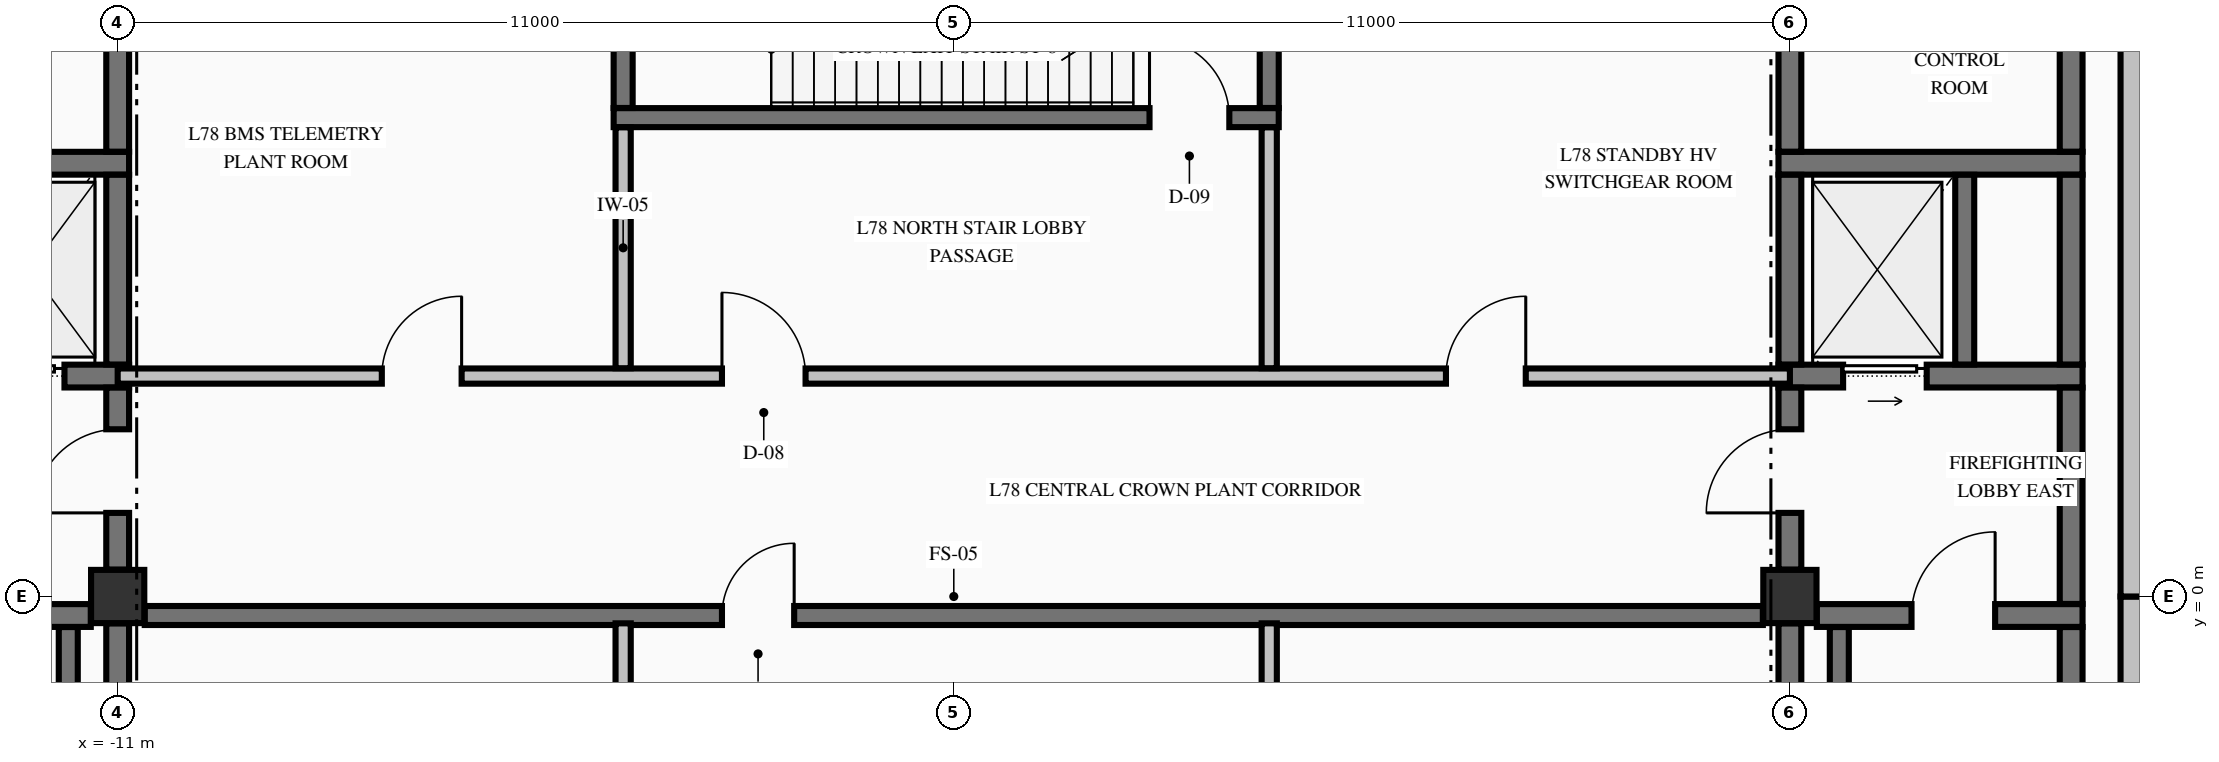
"""IFC4 building model, lengths in metres.
Left out: names, types, materials, properties, quantities, classifications, styles, units other than length and angle.
Written with IfcOpenShell. Run it as: python <this file> out.ifc"""

import sys

from ifc_helpers import new_model, si_unit, direction, frame, frame_2d, origin, origin_2d, place, context, subcontext, project, spatial, rectangle, extrude, element, fill, save


model = new_model("IFC4")
c1 = context("Model", 3, precision=1e-05, world=origin(), true_north=direction((0.0, 1.0)))
c2 = subcontext(c1, "Body", "Model", "MODEL_VIEW")
j1 = project(units=[si_unit("LENGTHUNIT", "METRE"), si_unit("PLANEANGLEUNIT", "RADIAN")], contexts=[c1])
p1 = place(None, origin())
s1 = spatial("IfcSite", under=j1, at=p1, CompositionType="ELEMENT")
p2 = place(p1, origin())
s2 = spatial("IfcBuilding", under=s1, at=p2, CompositionType="ELEMENT")
p3 = place(p2, frame((0.0, 0.0, 290.98)))
s3 = spatial("IfcBuildingStorey", under=s2, at=p3, CompositionType="ELEMENT", Elevation=290.98)
for number, where, z_axis, x_axis in (
    (1, (-11.0, 0.0, -0.325), (0.0, 0.0, 1.0), (1.0, 0.0, 0.0)),
    (2, (11.0, 0.0, -0.325), (0.0, 0.0, 1.0), (1.0, 0.0, 0.0)),
):
    element("IfcColumn", number, at=place(p3, frame(where, z_axis=z_axis, x_axis=x_axis)), inside=s3, PredefinedType="COLUMN", context=c2, shape_type="SweptSolid", body=[
        extrude(rectangle(XDim=0.7, YDim=0.7, at=origin_2d()), origin(), (0.0, 0.0, 1.0), 3.06),
    ])
for number, where, z_axis, x_axis in (
    (3, (15.5, -9.0, 0.0), (0.0, 0.0, 1.0), (0.0, 1.0, 0.0)),
    (4, (15.5, 0.0, 0.0), (0.0, 0.0, 1.0), (0.0, 1.0, 0.0)),
):
    element("IfcWall", number, at=place(p3, frame(where, z_axis=z_axis, x_axis=x_axis)), inside=s3, PredefinedType="STANDARD", context=c2, shape_type="SweptSolid", body=[
        extrude(rectangle(XDim=9.0, YDim=0.3, at=frame_2d((4.5, 0.0))), origin(), (0.0, 0.0, 1.0), 2.127),
    ])
p4 = place(p3, frame((-14.85, -0.25, 0.0), z_axis=(0.0, 0.0, 1.0), x_axis=(1.0, 0.0, 0.0)))
e5 = element("IfcWall", 5, at=p4, inside=s3, PredefinedType="SHEAR", context=c2, shape_type="SweptSolid", body=[
    extrude(rectangle(XDim=3.496, YDim=0.3, at=frame_2d((1.748, 0.0))), origin(), (0.0, 0.0, 1.0), 2.735),
])
p5 = place(p4, frame((1.15, 0.0, 0.0)))
e6 = element("IfcOpeningElement", 6, at=p5, cuts=e5, PredefinedType="OPENING", context=c2, shape_type="SweptSolid", body=[
    extrude(rectangle(XDim=1.1, YDim=2.15, at=frame_2d((0.55, 1.075))), frame((0.0, 0.16, 0.0), z_axis=(0.0, -1.0, 0.0), x_axis=(1.0, 0.0, 0.0)), (0.0, 0.0, 1.0), 0.32),
])
p6 = place(p3, frame((11.354, -0.25, 0.0), z_axis=(0.0, 0.0, 1.0), x_axis=(1.0, 0.0, 0.0)))
e7 = element("IfcWall", 7, at=p6, inside=s3, PredefinedType="SHEAR", context=c2, shape_type="SweptSolid", body=[
    extrude(rectangle(XDim=3.496, YDim=0.3, at=frame_2d((1.748, 0.0))), origin(), (0.0, 0.0, 1.0), 2.735),
])
p7 = place(p6, frame((1.246, 0.0, 0.0)))
e8 = element("IfcOpeningElement", 8, at=p7, cuts=e7, PredefinedType="OPENING", context=c2, shape_type="SweptSolid", body=[
    extrude(rectangle(XDim=1.1, YDim=2.15, at=frame_2d((0.55, 1.075))), frame((0.0, 0.16, 0.0), z_axis=(0.0, -1.0, 0.0), x_axis=(1.0, 0.0, 0.0)), (0.0, 0.0, 1.0), 0.32),
])
p8 = place(p3, frame((-14.85, 2.9, 0.0), z_axis=(0.0, 0.0, 1.0), x_axis=(1.0, 0.0, 0.0)))
e9 = element("IfcWall", 9, at=p8, inside=s3, PredefinedType="SHEAR", context=c2, shape_type="SweptSolid", body=[
    extrude(rectangle(XDim=4.0, YDim=0.3, at=frame_2d((2.0, 0.0))), origin(), (0.0, 0.0, 1.0), 2.735),
])
p9 = place(p8, frame((2.05, 0.0, 0.0)))
e10 = element("IfcOpeningElement", 10, at=p9, cuts=e9, PredefinedType="OPENING", context=c2, shape_type="SweptSolid", body=[
    extrude(rectangle(XDim=1.1, YDim=2.2, at=frame_2d((0.55, 1.1))), frame((0.0, 0.16, 0.0), z_axis=(0.0, -1.0, 0.0), x_axis=(1.0, 0.0, 0.0)), (0.0, 0.0, 1.0), 0.32),
])
p10 = place(p3, frame((10.85, 2.9, 0.0), z_axis=(0.0, 0.0, 1.0), x_axis=(1.0, 0.0, 0.0)))
e11 = element("IfcWall", 11, at=p10, inside=s3, PredefinedType="SHEAR", context=c2, shape_type="SweptSolid", body=[
    extrude(rectangle(XDim=4.0, YDim=0.3, at=frame_2d((2.0, 0.0))), origin(), (0.0, 0.0, 1.0), 2.735),
])
p11 = place(p10, frame((0.85, 0.0, 0.0)))
e12 = element("IfcOpeningElement", 12, at=p11, cuts=e11, PredefinedType="OPENING", context=c2, shape_type="SweptSolid", body=[
    extrude(rectangle(XDim=1.1, YDim=2.2, at=frame_2d((0.55, 1.1))), frame((0.0, 0.16, 0.0), z_axis=(0.0, -1.0, 0.0), x_axis=(1.0, 0.0, 0.0)), (0.0, 0.0, 1.0), 0.32),
])
for number, where, z_axis, x_axis in (
    (13, (-14.85, 5.7, 0.0), (0.0, 0.0, 1.0), (1.0, 0.0, 0.0)),
    (14, (10.85, 5.7, 0.0), (0.0, 0.0, 1.0), (1.0, 0.0, 0.0)),
):
    element("IfcWall", number, at=place(p3, frame(where, z_axis=z_axis, x_axis=x_axis)), inside=s3, PredefinedType="SHEAR", context=c2, shape_type="SweptSolid", body=[
        extrude(rectangle(XDim=4.0, YDim=0.3, at=frame_2d((2.0, 0.0))), origin(), (0.0, 0.0, 1.0), 2.735),
    ])
p12 = place(p3, frame((-4.475, 6.3, 0.0), z_axis=(0.0, 0.0, 1.0), x_axis=(1.0, 0.0, 0.0)))
e15 = element("IfcWall", 15, at=p12, inside=s3, PredefinedType="SOLIDWALL", context=c2, shape_type="SweptSolid", body=[
    extrude(rectangle(XDim=8.75, YDim=0.25, at=frame_2d((4.375, 0.0))), origin(), (0.0, 0.0, 1.0), 2.735),
])
p13 = place(p12, frame((7.05, 0.0, 0.0)))
e16 = element("IfcOpeningElement", 16, at=p13, cuts=e15, PredefinedType="OPENING", context=c2, shape_type="SweptSolid", body=[
    extrude(rectangle(XDim=1.05, YDim=2.15, at=frame_2d((0.525, 1.075))), frame((0.0, 0.135, 0.0), z_axis=(0.0, -1.0, 0.0), x_axis=(1.0, 0.0, 0.0)), (0.0, 0.0, 1.0), 0.27),
])
p14 = place(p3, frame((-10.644, -0.25, 0.0), z_axis=(0.0, 0.0, 1.0), x_axis=(1.0, 0.0, 0.0)))
e17 = element("IfcWall", 17, at=p14, inside=s3, PredefinedType="SOLIDWALL", context=c2, shape_type="SweptSolid", body=[
    extrude(rectangle(XDim=21.288, YDim=0.25, at=frame_2d((10.644, 0.0))), origin(), (0.0, 0.0, 1.0), 2.735),
])
p15 = place(p14, frame((7.594, 0.0, 0.0)))
e18 = element("IfcOpeningElement", 18, at=p15, cuts=e17, PredefinedType="OPENING", context=c2, shape_type="SweptSolid", body=[
    extrude(rectangle(XDim=0.95, YDim=2.02, at=frame_2d((0.475, 1.01))), frame((0.0, 0.135, 0.0), z_axis=(0.0, -1.0, 0.0), x_axis=(1.0, 0.0, 0.0)), (0.0, 0.0, 1.0), 0.27),
])
p16 = place(p3, frame((-11.0, 2.9, 0.0), z_axis=(0.0, 0.0, 1.0), x_axis=(1.0, 0.0, 0.0)))
e19 = element("IfcWall", 19, at=p16, inside=s3, PredefinedType="PARTITIONING", context=c2, shape_type="SweptSolid", body=[
    extrude(rectangle(XDim=22.0, YDim=0.2, at=frame_2d((11.0, 0.0))), origin(), (0.0, 0.0, 1.0), 2.735),
])
p17 = place(p16, frame((7.95, 0.0, 0.0)))
e20 = element("IfcOpeningElement", 20, at=p17, cuts=e19, PredefinedType="OPENING", context=c2, shape_type="SweptSolid", body=[
    extrude(rectangle(XDim=1.1, YDim=2.15, at=frame_2d((0.55, 1.075))), frame((0.0, 0.11, 0.0), z_axis=(0.0, -1.0, 0.0), x_axis=(1.0, 0.0, 0.0)), (0.0, 0.0, 1.0), 0.22),
])
p18 = place(p16, frame((17.475, 0.0, 0.0)))
e21 = element("IfcOpeningElement", 21, at=p18, cuts=e19, PredefinedType="OPENING", context=c2, shape_type="SweptSolid", body=[
    extrude(rectangle(XDim=1.05, YDim=2.15, at=frame_2d((0.525, 1.075))), frame((0.0, 0.11, 0.0), z_axis=(0.0, -1.0, 0.0), x_axis=(1.0, 0.0, 0.0)), (0.0, 0.0, 1.0), 0.22),
])
p19 = place(p16, frame((3.475, 0.0, 0.0)))
e22 = element("IfcOpeningElement", 22, at=p19, cuts=e19, PredefinedType="OPENING", context=c2, shape_type="SweptSolid", body=[
    extrude(rectangle(XDim=1.05, YDim=2.15, at=frame_2d((0.525, 1.075))), frame((0.0, 0.11, 0.0), z_axis=(0.0, -1.0, 0.0), x_axis=(1.0, 0.0, 0.0)), (0.0, 0.0, 1.0), 0.22),
])
p20 = place(p3, frame((-11.65, -9.798, 0.0), z_axis=(0.0, 0.0, 1.0), x_axis=(0.0, 1.0, 0.0)))
e23 = element("IfcWall", 23, at=p20, inside=s3, PredefinedType="SOLIDWALL", context=c2, shape_type="SweptSolid", body=[
    extrude(rectangle(XDim=9.396, YDim=0.25, at=frame_2d((4.698, 0.0))), origin(), (0.0, 0.0, 1.0), 2.735),
])
p21 = place(p3, frame((-11.0, -9.798, 0.0), z_axis=(0.0, 0.0, 1.0), x_axis=(0.0, 1.0, 0.0)))
e24 = element("IfcWall", 24, at=p21, inside=s3, PredefinedType="SHEAR", context=c2, shape_type="SweptSolid", body=[
    extrude(rectangle(XDim=9.444, YDim=0.3, at=frame_2d((4.722, 0.0))), origin(), (0.0, 0.0, 1.0), 2.735),
])
p22 = place(p3, frame((-11.0, 0.354, 0.0), z_axis=(0.0, 0.0, 1.0), x_axis=(0.0, 1.0, 0.0)))
e25 = element("IfcWall", 25, at=p22, inside=s3, PredefinedType="SHEAR", context=c2, shape_type="SweptSolid", body=[
    extrude(rectangle(XDim=2.394, YDim=0.3, at=frame_2d((1.197, 0.0))), origin(), (0.0, 0.0, 1.0), 2.735),
])
p23 = place(p22, frame((0.746, 0.0, 0.0)))
e26 = element("IfcOpeningElement", 26, at=p23, cuts=e25, PredefinedType="OPENING", context=c2, shape_type="SweptSolid", body=[
    extrude(rectangle(XDim=1.1, YDim=2.15, at=frame_2d((0.55, 1.075))), frame((0.0, 0.16, 0.0), z_axis=(0.0, -1.0, 0.0), x_axis=(1.0, 0.0, 0.0)), (0.0, 0.0, 1.0), 0.32),
])
p24 = place(p3, frame((-11.0, 3.052, 0.0), z_axis=(0.0, 0.0, 1.0), x_axis=(0.0, 1.0, 0.0)))
e27 = element("IfcWall", 27, at=p24, inside=s3, PredefinedType="SHEAR", context=c2, shape_type="SweptSolid", body=[
    extrude(rectangle(XDim=2.496, YDim=0.3, at=frame_2d((1.248, 0.0))), origin(), (0.0, 0.0, 1.0), 2.735),
])
p25 = place(p3, frame((-11.0, 5.852, 0.0), z_axis=(0.0, 0.0, 1.0), x_axis=(0.0, 1.0, 0.0)))
e28 = element("IfcWall", 28, at=p25, inside=s3, PredefinedType="SHEAR", context=c2, shape_type="SweptSolid", body=[
    extrude(rectangle(XDim=4.794, YDim=0.3, at=frame_2d((2.397, 0.0))), origin(), (0.0, 0.0, 1.0), 2.735),
])
p26 = place(p25, frame((2.418, 0.0, 0.0)))
e29 = element("IfcOpeningElement", 29, at=p26, cuts=e28, PredefinedType="OPENING", context=c2, shape_type="SweptSolid", body=[
    extrude(rectangle(XDim=0.9, YDim=2.15, at=frame_2d((0.45, 1.075))), frame((0.0, 0.16, 0.0), z_axis=(0.0, -1.0, 0.0), x_axis=(1.0, 0.0, 0.0)), (0.0, 0.0, 1.0), 0.32),
])
for number, where, z_axis, x_axis in (
    (30, (-4.35, 6.427, 0.0), (0.0, 0.0, 1.0), (0.0, 1.0, 0.0)),
    (31, (4.15, 6.427, 0.0), (0.0, 0.0, 1.0), (0.0, 1.0, 0.0)),
):
    element("IfcWall", number, at=place(p3, frame(where, z_axis=z_axis, x_axis=x_axis)), inside=s3, PredefinedType="SOLIDWALL", context=c2, shape_type="SweptSolid", body=[
        extrude(rectangle(XDim=1.546, YDim=0.25, at=frame_2d((0.773, 0.0))), origin(), (0.0, 0.0, 1.0), 2.735),
    ])
p27 = place(p3, frame((11.0, -9.798, 0.0), z_axis=(0.0, 0.0, 1.0), x_axis=(0.0, 1.0, 0.0)))
e32 = element("IfcWall", 32, at=p27, inside=s3, PredefinedType="SHEAR", context=c2, shape_type="SweptSolid", body=[
    extrude(rectangle(XDim=9.444, YDim=0.3, at=frame_2d((4.722, 0.0))), origin(), (0.0, 0.0, 1.0), 2.735),
])
p28 = place(p3, frame((11.0, 0.354, 0.0), z_axis=(0.0, 0.0, 1.0), x_axis=(0.0, 1.0, 0.0)))
e33 = element("IfcWall", 33, at=p28, inside=s3, PredefinedType="SHEAR", context=c2, shape_type="SweptSolid", body=[
    extrude(rectangle(XDim=2.394, YDim=0.3, at=frame_2d((1.197, 0.0))), origin(), (0.0, 0.0, 1.0), 2.735),
])
p29 = place(p28, frame((0.746, 0.0, 0.0)))
e34 = element("IfcOpeningElement", 34, at=p29, cuts=e33, PredefinedType="OPENING", context=c2, shape_type="SweptSolid", body=[
    extrude(rectangle(XDim=1.1, YDim=2.15, at=frame_2d((0.55, 1.075))), frame((0.0, 0.16, 0.0), z_axis=(0.0, -1.0, 0.0), x_axis=(1.0, 0.0, 0.0)), (0.0, 0.0, 1.0), 0.32),
])
p30 = place(p3, frame((11.0, 3.052, 0.0), z_axis=(0.0, 0.0, 1.0), x_axis=(0.0, 1.0, 0.0)))
e35 = element("IfcWall", 35, at=p30, inside=s3, PredefinedType="SHEAR", context=c2, shape_type="SweptSolid", body=[
    extrude(rectangle(XDim=2.496, YDim=0.3, at=frame_2d((1.248, 0.0))), origin(), (0.0, 0.0, 1.0), 2.735),
])
p31 = place(p3, frame((11.0, 5.852, 0.0), z_axis=(0.0, 0.0, 1.0), x_axis=(0.0, 1.0, 0.0)))
e36 = element("IfcWall", 36, at=p31, inside=s3, PredefinedType="SHEAR", context=c2, shape_type="SweptSolid", body=[
    extrude(rectangle(XDim=4.794, YDim=0.3, at=frame_2d((2.397, 0.0))), origin(), (0.0, 0.0, 1.0), 2.735),
])
p32 = place(p31, frame((2.418, 0.0, 0.0)))
e37 = element("IfcOpeningElement", 37, at=p32, cuts=e36, PredefinedType="OPENING", context=c2, shape_type="SweptSolid", body=[
    extrude(rectangle(XDim=0.9, YDim=2.15, at=frame_2d((0.45, 1.075))), frame((0.0, 0.16, 0.0), z_axis=(0.0, -1.0, 0.0), x_axis=(1.0, 0.0, 0.0)), (0.0, 0.0, 1.0), 0.32),
])
p33 = place(p3, frame((11.65, -9.798, 0.0), z_axis=(0.0, 0.0, 1.0), x_axis=(0.0, 1.0, 0.0)))
e38 = element("IfcWall", 38, at=p33, inside=s3, PredefinedType="SOLIDWALL", context=c2, shape_type="SweptSolid", body=[
    extrude(rectangle(XDim=9.396, YDim=0.25, at=frame_2d((4.698, 0.0))), origin(), (0.0, 0.0, 1.0), 2.735),
])
p34 = place(p3, frame((13.3, 3.052, 0.0), z_axis=(0.0, 0.0, 1.0), x_axis=(0.0, 1.0, 0.0)))
e39 = element("IfcWall", 39, at=p34, inside=s3, PredefinedType="SOLIDWALL", context=c2, shape_type="SweptSolid", body=[
    extrude(rectangle(XDim=2.496, YDim=0.25, at=frame_2d((1.248, 0.0))), origin(), (0.0, 0.0, 1.0), 2.735),
])
p35 = place(p3, frame((14.7, -9.798, 0.0), z_axis=(0.0, 0.0, 1.0), x_axis=(0.0, 1.0, 0.0)))
e40 = element("IfcWall", 40, at=p35, inside=s3, PredefinedType="SHEAR", context=c2, shape_type="SweptSolid", body=[
    extrude(rectangle(XDim=9.396, YDim=0.3, at=frame_2d((4.698, 0.0))), origin(), (0.0, 0.0, 1.0), 2.735),
])
p36 = place(p3, frame((14.7, -0.098, 0.0), z_axis=(0.0, 0.0, 1.0), x_axis=(0.0, 1.0, 0.0)))
e41 = element("IfcWall", 41, at=p36, inside=s3, PredefinedType="SHEAR", context=c2, shape_type="SweptSolid", body=[
    extrude(rectangle(XDim=2.846, YDim=0.3, at=frame_2d((1.423, 0.0))), origin(), (0.0, 0.0, 1.0), 2.735),
])
p37 = place(p3, frame((14.7, 3.052, 0.0), z_axis=(0.0, 0.0, 1.0), x_axis=(0.0, 1.0, 0.0)))
e42 = element("IfcWall", 42, at=p37, inside=s3, PredefinedType="SHEAR", context=c2, shape_type="SweptSolid", body=[
    extrude(rectangle(XDim=2.496, YDim=0.3, at=frame_2d((1.248, 0.0))), origin(), (0.0, 0.0, 1.0), 2.735),
])
p38 = place(p3, frame((14.7, 5.852, 0.0), z_axis=(0.0, 0.0, 1.0), x_axis=(0.0, 1.0, 0.0)))
e43 = element("IfcWall", 43, at=p38, inside=s3, PredefinedType="SHEAR", context=c2, shape_type="SweptSolid", body=[
    extrude(rectangle(XDim=4.496, YDim=0.3, at=frame_2d((2.248, 0.0))), origin(), (0.0, 0.0, 1.0), 2.735),
])
p39 = place(p3, frame((-4.35, -6.172, 0.0), z_axis=(0.0, 0.0, 1.0), x_axis=(0.0, 1.0, 0.0)))
e44 = element("IfcWall", 44, at=p39, inside=s3, PredefinedType="PARTITIONING", context=c2, shape_type="SweptSolid", body=[
    extrude(rectangle(XDim=5.819, YDim=0.2, at=frame_2d((2.91, 0.0))), origin(), (0.0, 0.0, 1.0), 2.735),
])
p40 = place(p39, frame((2.447, 0.0, 0.0)))
e45 = element("IfcOpeningElement", 45, at=p40, cuts=e44, PredefinedType="OPENING", context=c2, shape_type="SweptSolid", body=[
    extrude(rectangle(XDim=1.05, YDim=2.15, at=frame_2d((0.525, 1.075))), frame((0.0, 0.11, 0.0), z_axis=(0.0, -1.0, 0.0), x_axis=(1.0, 0.0, 0.0)), (0.0, 0.0, 1.0), 0.22),
])
p41 = place(p3, frame((-4.35, 3.003, 0.0), z_axis=(0.0, 0.0, 1.0), x_axis=(0.0, 1.0, 0.0)))
e46 = element("IfcWall", 46, at=p41, inside=s3, PredefinedType="PARTITIONING", context=c2, shape_type="SweptSolid", body=[
    extrude(rectangle(XDim=3.169, YDim=0.2, at=frame_2d((1.584, 0.0))), origin(), (0.0, 0.0, 1.0), 2.735),
])
p42 = place(p3, frame((4.15, -6.172, 0.0), z_axis=(0.0, 0.0, 1.0), x_axis=(0.0, 1.0, 0.0)))
e47 = element("IfcWall", 47, at=p42, inside=s3, PredefinedType="PARTITIONING", context=c2, shape_type="SweptSolid", body=[
    extrude(rectangle(XDim=5.819, YDim=0.2, at=frame_2d((2.91, 0.0))), origin(), (0.0, 0.0, 1.0), 2.735),
])
p43 = place(p42, frame((2.447, 0.0, 0.0)))
e48 = element("IfcOpeningElement", 48, at=p43, cuts=e47, PredefinedType="OPENING", context=c2, shape_type="SweptSolid", body=[
    extrude(rectangle(XDim=1.05, YDim=2.15, at=frame_2d((0.525, 1.075))), frame((0.0, 0.11, 0.0), z_axis=(0.0, -1.0, 0.0), x_axis=(1.0, 0.0, 0.0)), (0.0, 0.0, 1.0), 0.22),
])
p44 = place(p3, frame((4.15, 3.003, 0.0), z_axis=(0.0, 0.0, 1.0), x_axis=(0.0, 1.0, 0.0)))
e49 = element("IfcWall", 49, at=p44, inside=s3, PredefinedType="PARTITIONING", context=c2, shape_type="SweptSolid", body=[
    extrude(rectangle(XDim=3.169, YDim=0.2, at=frame_2d((1.584, 0.0))), origin(), (0.0, 0.0, 1.0), 2.735),
])
p45 = place(p23, origin())
e50 = element("IfcDoor", 50, at=p45, inside=s3, OperationType="SINGLE_SWING_LEFT", PredefinedType="DOOR", context=c2, shape_type="SweptSolid", body=[
    extrude(rectangle(XDim=1.1, YDim=2.15, at=frame_2d((0.55, 1.075))), frame((0.0, 0.025, 0.0), z_axis=(0.0, -1.0, 0.0), x_axis=(1.0, 0.0, 0.0)), (0.0, 0.0, 1.0), 0.05),
])
fill(e26, e50)
p46 = place(p9, origin())
e51 = element("IfcDoor", 51, at=p46, inside=s3, OperationType="SLIDING_TO_LEFT", PredefinedType="DOOR", context=c2, shape_type="SweptSolid", body=[
    extrude(rectangle(XDim=1.1, YDim=2.2, at=frame_2d((0.55, 1.1))), frame((0.0, 0.025, 0.0), z_axis=(0.0, -1.0, 0.0), x_axis=(1.0, 0.0, 0.0)), (0.0, 0.0, 1.0), 0.05),
])
fill(e10, e51)
p47 = place(p7, origin())
e52 = element("IfcDoor", 52, at=p47, inside=s3, OperationType="SINGLE_SWING_RIGHT", PredefinedType="DOOR", context=c2, shape_type="SweptSolid", body=[
    extrude(rectangle(XDim=1.1, YDim=2.15, at=frame_2d((0.55, 1.075))), frame((0.0, 0.025, 0.0), z_axis=(0.0, -1.0, 0.0), x_axis=(1.0, 0.0, 0.0)), (0.0, 0.0, 1.0), 0.05),
])
fill(e8, e52)
p48 = place(p29, origin())
e53 = element("IfcDoor", 53, at=p48, inside=s3, OperationType="SINGLE_SWING_LEFT", PredefinedType="DOOR", context=c2, shape_type="SweptSolid", body=[
    extrude(rectangle(XDim=1.1, YDim=2.15, at=frame_2d((0.55, 1.075))), frame((0.0, 0.025, 0.0), z_axis=(0.0, -1.0, 0.0), x_axis=(1.0, 0.0, 0.0)), (0.0, 0.0, 1.0), 0.05),
])
fill(e34, e53)
p49 = place(p11, origin())
e54 = element("IfcDoor", 54, at=p49, inside=s3, OperationType="SLIDING_TO_RIGHT", PredefinedType="DOOR", context=c2, shape_type="SweptSolid", body=[
    extrude(rectangle(XDim=1.1, YDim=2.2, at=frame_2d((0.55, 1.1))), frame((0.0, 0.025, 0.0), z_axis=(0.0, -1.0, 0.0), x_axis=(1.0, 0.0, 0.0)), (0.0, 0.0, 1.0), 0.05),
])
fill(e12, e54)
p50 = place(p13, origin())
e55 = element("IfcDoor", 55, at=p50, inside=s3, OperationType="SINGLE_SWING_LEFT", PredefinedType="DOOR", context=c2, shape_type="SweptSolid", body=[
    extrude(rectangle(XDim=1.05, YDim=2.15, at=frame_2d((0.525, 1.075))), frame((0.0, 0.025, 0.0), z_axis=(0.0, -1.0, 0.0), x_axis=(1.0, 0.0, 0.0)), (0.0, 0.0, 1.0), 0.05),
])
fill(e16, e55)
p51 = place(p15, origin())
e56 = element("IfcDoor", 56, at=p51, inside=s3, OperationType="SINGLE_SWING_RIGHT", PredefinedType="DOOR", context=c2, shape_type="SweptSolid", body=[
    extrude(rectangle(XDim=0.95, YDim=2.02, at=frame_2d((0.475, 1.01))), frame((0.0, 0.025, 0.0), z_axis=(0.0, -1.0, 0.0), x_axis=(1.0, 0.0, 0.0)), (0.0, 0.0, 1.0), 0.05),
])
fill(e18, e56)
p52 = place(p17, origin())
e57 = element("IfcDoor", 57, at=p52, inside=s3, OperationType="SINGLE_SWING_LEFT", PredefinedType="DOOR", context=c2, shape_type="SweptSolid", body=[
    extrude(rectangle(XDim=1.1, YDim=2.15, at=frame_2d((0.55, 1.075))), frame((0.0, 0.025, 0.0), z_axis=(0.0, -1.0, 0.0), x_axis=(1.0, 0.0, 0.0)), (0.0, 0.0, 1.0), 0.05),
])
fill(e20, e57)
p53 = place(p18, origin())
e58 = element("IfcDoor", 58, at=p53, inside=s3, OperationType="SINGLE_SWING_RIGHT", PredefinedType="DOOR", context=c2, shape_type="SweptSolid", body=[
    extrude(rectangle(XDim=1.05, YDim=2.15, at=frame_2d((0.525, 1.075))), frame((0.0, 0.025, 0.0), z_axis=(0.0, -1.0, 0.0), x_axis=(1.0, 0.0, 0.0)), (0.0, 0.0, 1.0), 0.05),
])
fill(e21, e58)
p54 = place(p19, origin())
e59 = element("IfcDoor", 59, at=p54, inside=s3, OperationType="SINGLE_SWING_RIGHT", PredefinedType="DOOR", context=c2, shape_type="SweptSolid", body=[
    extrude(rectangle(XDim=1.05, YDim=2.15, at=frame_2d((0.525, 1.075))), frame((0.0, 0.025, 0.0), z_axis=(0.0, -1.0, 0.0), x_axis=(1.0, 0.0, 0.0)), (0.0, 0.0, 1.0), 0.05),
])
fill(e22, e59)
save(model, sys.argv[1])
